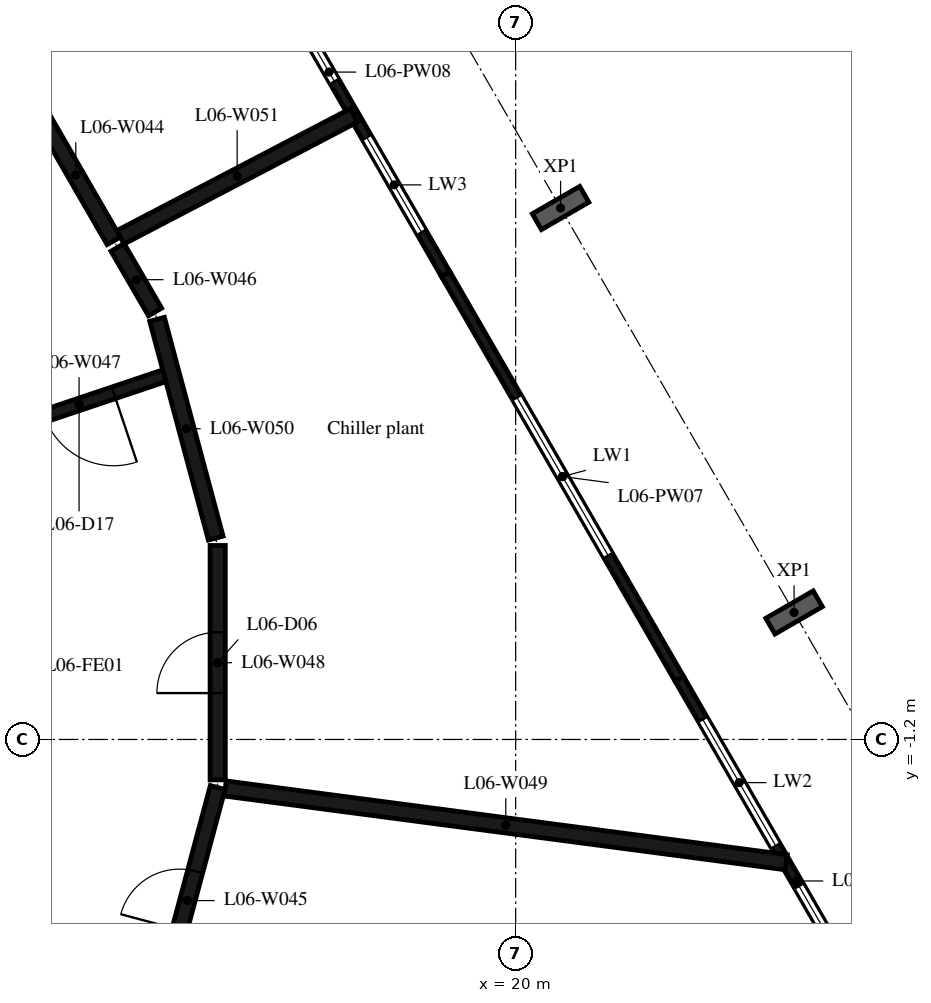
"""IFC4 building model, lengths in metres.
Left out: names, types, materials, properties, quantities, classifications, styles, units other than length and angle.
Written with IfcOpenShell. Run it as: python <this file> out.ifc"""

import sys

from ifc_helpers import new_model, si_unit, direction, frame, frame_2d, origin, origin_2d, place, context, subcontext, project, spatial, rectangle, i_section, extrude, element, fill, save


model = new_model("IFC4")
c1 = context("Model", 3, precision=1e-05, world=origin(), true_north=direction((0.0, 1.0)))
c2 = subcontext(c1, "Body", "Model", "MODEL_VIEW")
j1 = project(units=[si_unit("LENGTHUNIT", "METRE"), si_unit("PLANEANGLEUNIT", "RADIAN")], contexts=[c1])
p1 = place(None, origin())
s1 = spatial("IfcSite", under=j1, at=p1, CompositionType="ELEMENT")
p2 = place(p1, origin())
s2 = spatial("IfcBuilding", under=s1, at=p2, CompositionType="ELEMENT")
p3 = place(p2, frame((0.0, 0.0, 33.0)))
s3 = spatial("IfcBuildingStorey", under=s2, at=p3, CompositionType="ELEMENT", Elevation=33.0)
for number, where, z_axis, x_axis in (
    (1, (24.579, 0.888, -0.45), (0.0, 0.0, 1.0), (0.5, -0.866, 0.0)),
    (2, (20.739, 7.539, -0.45), (0.0, 0.0, 1.0), (0.5, -0.866, 0.0)),
):
    element("IfcColumn", number, at=place(p3, frame(where, z_axis=z_axis, x_axis=x_axis)), inside=s3, PredefinedType="COLUMN", context=c2, shape_type="SweptSolid", body=[
        extrude(i_section(OverallWidth=0.3, OverallDepth=0.9, WebThickness=0.019, FlangeThickness=0.035, FilletRadius=0.03, at=origin_2d()), origin(), (0.0, 0.0, 1.0), 5.4),
    ])
p4 = place(p3, frame((26.531, -6.853, 0.0), z_axis=(0.0, 0.0, 1.0), x_axis=(-0.500005879718, 0.866022009101, 0.0)))
e3 = element("IfcWall", 3, at=p4, inside=s3, PredefinedType="STANDARD", context=c2, shape_type="SweptSolid", body=[
    extrude(rectangle(XDim=7.68, YDim=0.16, at=frame_2d((3.84, 0.0))), origin(), (0.0, 0.0, 1.0), 4.95),
])
p5 = place(p4, frame((0.743, 0.0, 1.0)))
e4 = element("IfcOpeningElement", 4, at=p5, cuts=e3, PredefinedType="OPENING", context=c2, shape_type="SweptSolid", body=[
    extrude(rectangle(XDim=3.0, YDim=2.2, at=frame_2d((1.5, 1.1))), frame((0.0, 0.09, 0.0), z_axis=(0.0, -1.0, 0.0), x_axis=(1.0, 0.0, 0.0)), (0.0, 0.0, 1.0), 0.18),
])
p6 = place(p4, frame((4.508, 0.0, 1.0)))
e5 = element("IfcOpeningElement", 5, at=p6, cuts=e3, PredefinedType="OPENING", context=c2, shape_type="SweptSolid", body=[
    extrude(rectangle(XDim=2.4, YDim=2.2, at=frame_2d((1.2, 1.1))), frame((0.0, 0.09, 0.0), z_axis=(0.0, -1.0, 0.0), x_axis=(1.0, 0.0, 0.0)), (0.0, 0.0, 1.0), 0.18),
])
p7 = place(p3, frame((22.691, -0.202, 0.0), z_axis=(0.0, 0.0, 1.0), x_axis=(-0.499982037744, 0.86603577405, 0.0)))
e6 = element("IfcWall", 6, at=p7, inside=s3, PredefinedType="STANDARD", context=c2, shape_type="SweptSolid", body=[
    extrude(rectangle(XDim=7.68, YDim=0.16, at=frame_2d((3.84, 0.0))), origin(), (0.0, 0.0, 1.0), 4.95),
])
p8 = place(p7, frame((2.34, 0.0, 1.0)))
e7 = element("IfcOpeningElement", 7, at=p8, cuts=e6, PredefinedType="OPENING", context=c2, shape_type="SweptSolid", body=[
    extrude(rectangle(XDim=3.0, YDim=2.2, at=frame_2d((1.5, 1.1))), frame((0.0, 0.09, 0.0), z_axis=(0.0, -1.0, 0.0), x_axis=(1.0, 0.0, 0.0)), (0.0, 0.0, 1.0), 0.18),
])
p9 = place(p3, frame((18.851, 6.449, 0.0), z_axis=(0.0, 0.0, 1.0), x_axis=(-0.500005879718, 0.866022009101, 0.0)))
e8 = element("IfcWall", 8, at=p9, inside=s3, PredefinedType="STANDARD", context=c2, shape_type="SweptSolid", body=[
    extrude(rectangle(XDim=7.68, YDim=0.16, at=frame_2d((3.84, 0.0))), origin(), (0.0, 0.0, 1.0), 4.95),
])
p10 = place(p9, frame((0.798, 0.0, 1.0)))
e9 = element("IfcOpeningElement", 9, at=p10, cuts=e8, PredefinedType="OPENING", context=c2, shape_type="SweptSolid", body=[
    extrude(rectangle(XDim=1.8, YDim=2.2, at=frame_2d((0.9, 1.1))), frame((0.0, 0.09, 0.0), z_axis=(0.0, -1.0, 0.0), x_axis=(1.0, 0.0, 0.0)), (0.0, 0.0, 1.0), 0.18),
])
p11 = place(p9, frame((3.663, 0.0, 1.0)))
e10 = element("IfcOpeningElement", 10, at=p11, cuts=e8, PredefinedType="OPENING", context=c2, shape_type="SweptSolid", body=[
    extrude(rectangle(XDim=3.0, YDim=2.2, at=frame_2d((1.5, 1.1))), frame((0.0, 0.09, 0.0), z_axis=(0.0, -1.0, 0.0), x_axis=(1.0, 0.0, 0.0)), (0.0, 0.0, 1.0), 0.18),
])
p12 = place(p3, frame((13.39, 7.0, 0.0), z_axis=(0.0, 0.0, 1.0), x_axis=(-0.499790202325, 0.86614649665, 0.0)))
e11 = element("IfcWall", 11, at=p12, inside=s3, PredefinedType="PARTITIONING", context=c2, shape_type="SweptSolid", body=[
    extrude(rectangle(XDim=2.496, YDim=0.25, at=frame_2d((1.248, 0.0))), origin(), (0.0, 0.0, 1.0), 4.95),
])
p13 = place(p3, frame((14.102, -5.709, 0.0), z_axis=(0.0, 0.0, 1.0), x_axis=(0.259118468411, 0.965845546311, 0.0)))
e12 = element("IfcWall", 12, at=p13, inside=s3, PredefinedType="PARTITIONING", context=c2, shape_type="SweptSolid", body=[
    extrude(rectangle(XDim=3.851, YDim=0.25, at=frame_2d((1.925, 0.0))), origin(), (0.0, 0.0, 1.0), 4.95),
])
p14 = place(p13, frame((1.425, 0.0, 0.0)))
e13 = element("IfcOpeningElement", 13, at=p14, cuts=e12, PredefinedType="OPENING", context=c2, shape_type="SweptSolid", body=[
    extrude(rectangle(XDim=1.0, YDim=2.1, at=frame_2d((0.5, 1.05))), frame((0.0, 0.135, 0.0), z_axis=(0.0, -1.0, 0.0), x_axis=(1.0, 0.0, 0.0)), (0.0, 0.0, 1.0), 0.27),
])
p15 = place(p3, frame((14.07, 5.83, 0.0), z_axis=(0.0, 0.0, 1.0), x_axis=(-0.502547897079, 0.864549368828, 0.0)))
e14 = element("IfcWall", 14, at=p15, inside=s3, PredefinedType="PARTITIONING", context=c2, shape_type="SweptSolid", body=[
    extrude(rectangle(XDim=1.228, YDim=0.25, at=frame_2d((0.614, 0.0))), origin(), (0.0, 0.0, 1.0), 4.95),
])
p16 = place(p3, frame((14.34, 4.82, 0.0), z_axis=(0.0, 0.0, 1.0), x_axis=(-0.94805712629, -0.318100118345, 0.0)))
e15 = element("IfcWall", 15, at=p16, inside=s3, PredefinedType="PARTITIONING", context=c2, shape_type="SweptSolid", body=[
    extrude(rectangle(XDim=3.207, YDim=0.2, at=frame_2d((1.603, 0.0))), origin(), (0.0, 0.0, 1.0), 4.95),
])
p17 = place(p16, frame((1.003, 0.0, 0.0)))
e16 = element("IfcOpeningElement", 16, at=p17, cuts=e15, PredefinedType="OPENING", context=c2, shape_type="SweptSolid", body=[
    extrude(rectangle(XDim=1.2, YDim=2.1, at=frame_2d((0.6, 1.05))), frame((0.0, 0.11, 0.0), z_axis=(0.0, -1.0, 0.0), x_axis=(1.0, 0.0, 0.0)), (0.0, 0.0, 1.0), 0.22),
])
p18 = place(p3, frame((15.1, -1.865, 0.0), z_axis=(0.0, 0.0, 1.0), x_axis=(0.0, 1.0, 0.0)))
e17 = element("IfcWall", 17, at=p18, inside=s3, PredefinedType="PARTITIONING", context=c2, shape_type="SweptSolid", body=[
    extrude(rectangle(XDim=3.855, YDim=0.25, at=frame_2d((1.927, 0.0))), origin(), (0.0, 0.0, 1.0), 4.95),
])
p19 = place(p18, frame((1.427, 0.0, 0.0)))
e18 = element("IfcOpeningElement", 18, at=p19, cuts=e17, PredefinedType="OPENING", context=c2, shape_type="SweptSolid", body=[
    extrude(rectangle(XDim=1.0, YDim=2.1, at=frame_2d((0.5, 1.05))), frame((0.0, 0.135, 0.0), z_axis=(0.0, -1.0, 0.0), x_axis=(1.0, 0.0, 0.0)), (0.0, 0.0, 1.0), 0.27),
])
p20 = place(p3, frame((15.224, -2.006, 0.0), z_axis=(0.0, 0.0, 1.0), x_axis=(0.991467059625, -0.130357468824, 0.0)))
e19 = element("IfcWall", 19, at=p20, inside=s3, PredefinedType="PARTITIONING", context=c2, shape_type="SweptSolid", body=[
    extrude(rectangle(XDim=9.306, YDim=0.25, at=frame_2d((4.653, 0.0))), origin(), (0.0, 0.0, 1.0), 4.95),
])
p21 = place(p3, frame((15.068, 2.111, 0.0), z_axis=(0.0, 0.0, 1.0), x_axis=(-0.259106201401, 0.965848837239, 0.0)))
e20 = element("IfcWall", 20, at=p21, inside=s3, PredefinedType="PARTITIONING", context=c2, shape_type="SweptSolid", body=[
    extrude(rectangle(XDim=3.726, YDim=0.25, at=frame_2d((1.863, 0.0))), origin(), (0.0, 0.0, 1.0), 4.95),
])
p22 = place(p3, frame((17.339, 9.063, 0.0), z_axis=(0.0, 0.0, 1.0), x_axis=(-0.886348502882, -0.463018716078, 0.0)))
e21 = element("IfcWall", 21, at=p22, inside=s3, PredefinedType="PARTITIONING", context=c2, shape_type="SweptSolid", body=[
    extrude(rectangle(XDim=4.331, YDim=0.25, at=frame_2d((2.165, 0.0))), origin(), (0.0, 0.0, 1.0), 4.95),
])
p23 = place(p5, origin())
e22 = element("IfcWindow", 22, at=p23, inside=s3, PartitioningType="SINGLE_PANEL", PredefinedType="WINDOW", context=c2, shape_type="SweptSolid", body=[
    extrude(rectangle(XDim=3.0, YDim=2.2, at=frame_2d((1.5, 1.1))), frame((0.0, 0.03, 0.0), z_axis=(0.0, -1.0, 0.0), x_axis=(1.0, 0.0, 0.0)), (0.0, 0.0, 1.0), 0.06),
])
fill(e4, e22)
p24 = place(p6, origin())
e23 = element("IfcWindow", 23, at=p24, inside=s3, PartitioningType="SINGLE_PANEL", PredefinedType="WINDOW", context=c2, shape_type="SweptSolid", body=[
    extrude(rectangle(XDim=2.4, YDim=2.2, at=frame_2d((1.2, 1.1))), frame((0.0, 0.03, 0.0), z_axis=(0.0, -1.0, 0.0), x_axis=(1.0, 0.0, 0.0)), (0.0, 0.0, 1.0), 0.06),
])
fill(e5, e23)
p25 = place(p8, origin())
e24 = element("IfcWindow", 24, at=p25, inside=s3, PartitioningType="SINGLE_PANEL", PredefinedType="WINDOW", context=c2, shape_type="SweptSolid", body=[
    extrude(rectangle(XDim=3.0, YDim=2.2, at=frame_2d((1.5, 1.1))), frame((0.0, 0.03, 0.0), z_axis=(0.0, -1.0, 0.0), x_axis=(1.0, 0.0, 0.0)), (0.0, 0.0, 1.0), 0.06),
])
fill(e7, e24)
p26 = place(p10, origin())
e25 = element("IfcWindow", 25, at=p26, inside=s3, PartitioningType="SINGLE_PANEL", PredefinedType="WINDOW", context=c2, shape_type="SweptSolid", body=[
    extrude(rectangle(XDim=1.8, YDim=2.2, at=frame_2d((0.9, 1.1))), frame((0.0, 0.03, 0.0), z_axis=(0.0, -1.0, 0.0), x_axis=(1.0, 0.0, 0.0)), (0.0, 0.0, 1.0), 0.06),
])
fill(e9, e25)
p27 = place(p11, origin())
e26 = element("IfcWindow", 26, at=p27, inside=s3, PartitioningType="SINGLE_PANEL", PredefinedType="WINDOW", context=c2, shape_type="SweptSolid", body=[
    extrude(rectangle(XDim=3.0, YDim=2.2, at=frame_2d((1.5, 1.1))), frame((0.0, 0.03, 0.0), z_axis=(0.0, -1.0, 0.0), x_axis=(1.0, 0.0, 0.0)), (0.0, 0.0, 1.0), 0.06),
])
fill(e10, e26)
p28 = place(p14, origin())
e27 = element("IfcDoor", 27, at=p28, inside=s3, OperationType="SINGLE_SWING_LEFT", PredefinedType="DOOR", context=c2, shape_type="SweptSolid", body=[
    extrude(rectangle(XDim=1.0, YDim=2.1, at=frame_2d((0.5, 1.05))), frame((0.0, 0.025, 0.0), z_axis=(0.0, -1.0, 0.0), x_axis=(1.0, 0.0, 0.0)), (0.0, 0.0, 1.0), 0.05),
])
fill(e13, e27)
p29 = place(p19, origin())
e28 = element("IfcDoor", 28, at=p29, inside=s3, OperationType="SINGLE_SWING_LEFT", PredefinedType="DOOR", context=c2, shape_type="SweptSolid", body=[
    extrude(rectangle(XDim=1.0, YDim=2.1, at=frame_2d((0.5, 1.05))), frame((0.0, 0.025, 0.0), z_axis=(0.0, -1.0, 0.0), x_axis=(1.0, 0.0, 0.0)), (0.0, 0.0, 1.0), 0.05),
])
fill(e18, e28)
p30 = place(p17, origin())
e29 = element("IfcDoor", 29, at=p30, inside=s3, OperationType="SINGLE_SWING_LEFT", PredefinedType="DOOR", context=c2, shape_type="SweptSolid", body=[
    extrude(rectangle(XDim=1.2, YDim=2.1, at=frame_2d((0.6, 1.05))), frame((0.0, 0.025, 0.0), z_axis=(0.0, -1.0, 0.0), x_axis=(1.0, 0.0, 0.0)), (0.0, 0.0, 1.0), 0.05),
])
fill(e16, e29)
save(model, sys.argv[1])
